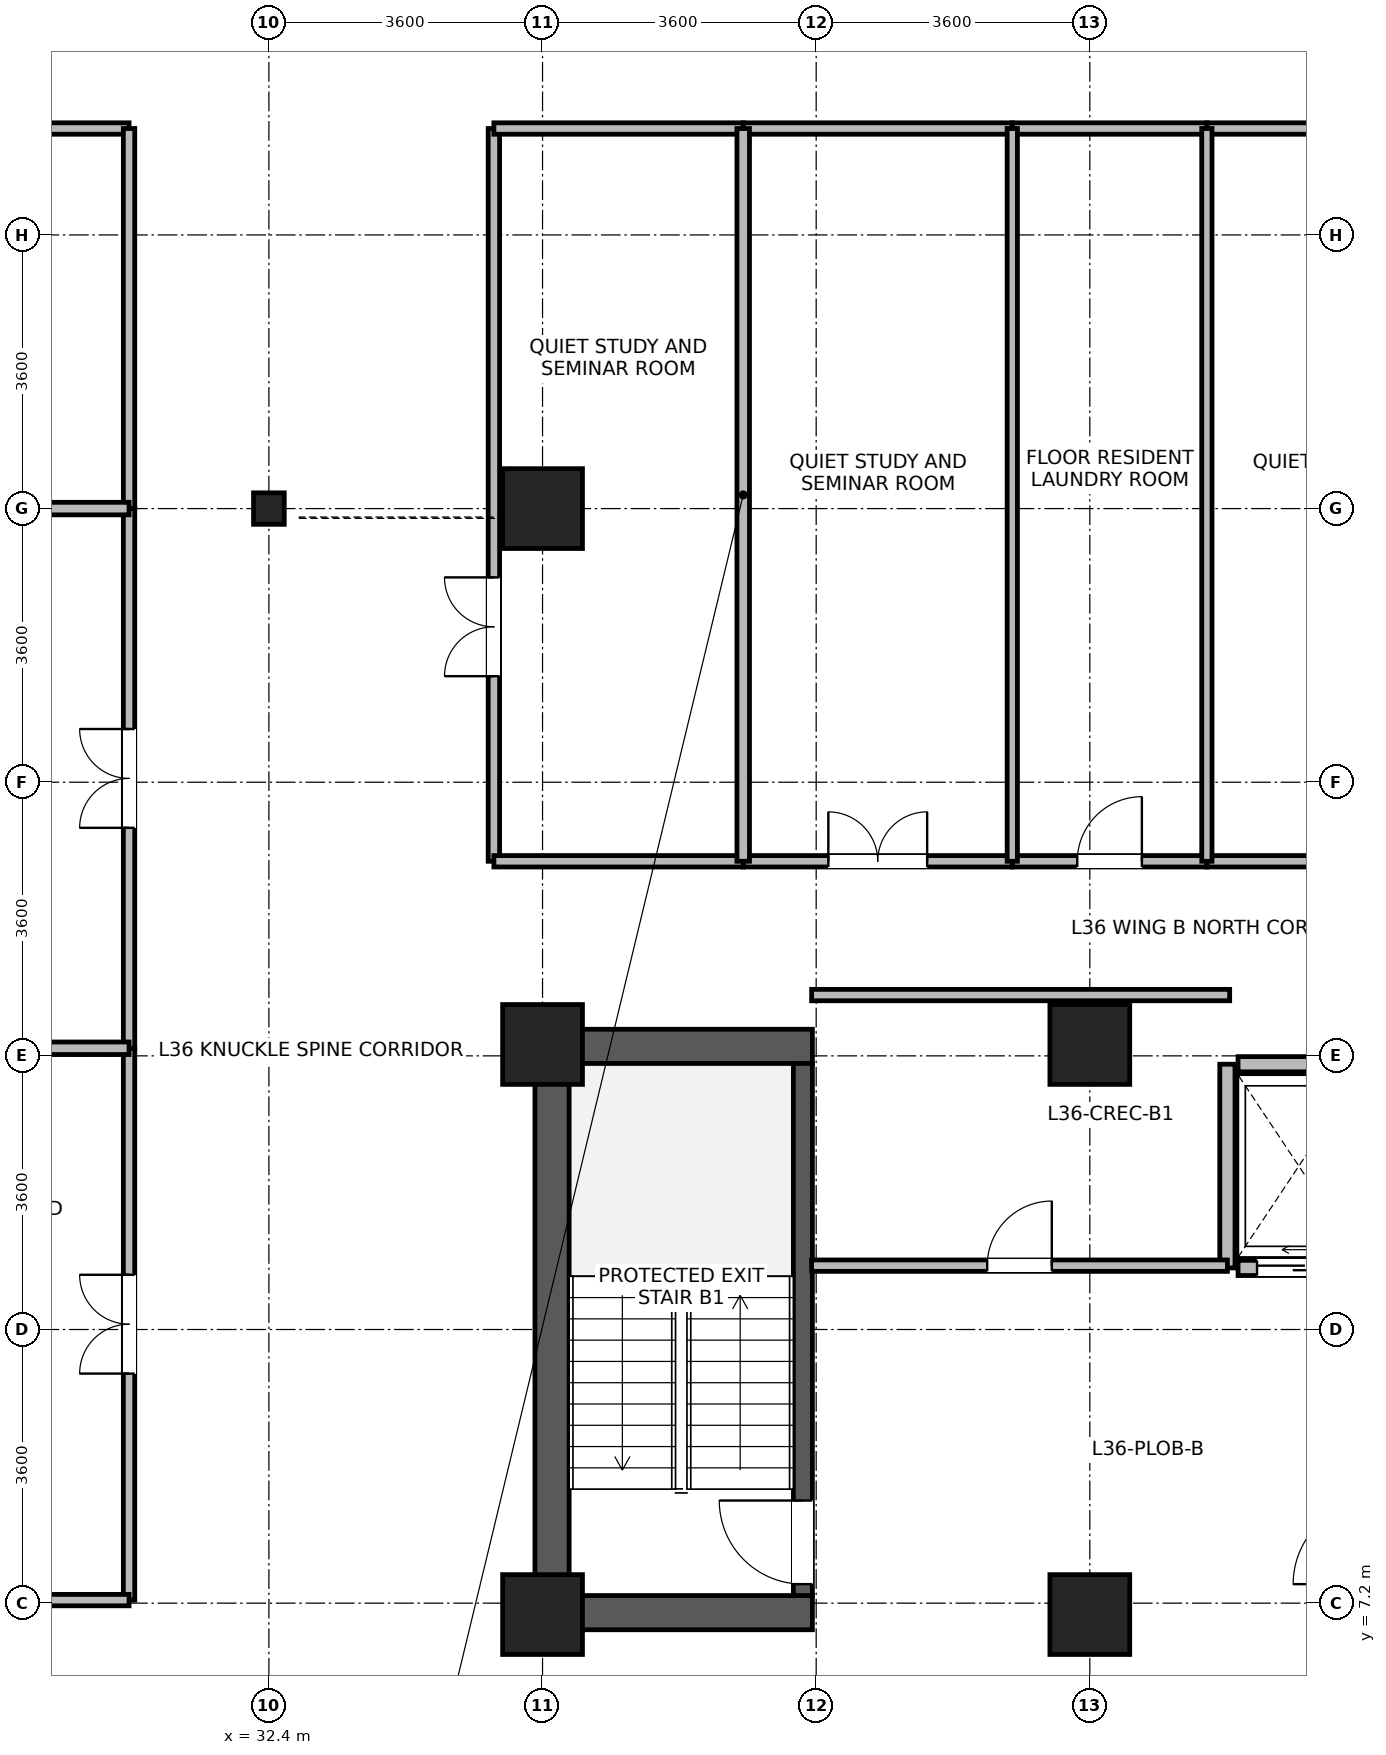
"""IFC4 building model, lengths in metres.
Left out: names, types, materials, properties, quantities, classifications, styles, units other than length and angle.
Written with IfcOpenShell. Run it as: python <this file> out.ifc"""

import sys

from ifc_helpers import new_model, si_unit, direction, frame, frame_2d, origin, origin_2d, place, context, subcontext, project, spatial, rectangle, i_section, extrude, source, transform, mapped, element, fill, save


model = new_model("IFC4")
c1 = context("Model", 3, precision=1e-05, world=origin(), true_north=direction((0.0, 1.0)))
c2 = subcontext(c1, "Body", "Model", "MODEL_VIEW")
j1 = project(units=[si_unit("LENGTHUNIT", "METRE"), si_unit("PLANEANGLEUNIT", "RADIAN")], contexts=[c1])
p1 = place(None, origin())
s1 = spatial("IfcSite", under=j1, at=p1, CompositionType="ELEMENT")
p2 = place(p1, origin())
s2 = spatial("IfcBuilding", under=s1, at=p2, CompositionType="ELEMENT")
p3 = place(p2, frame((0.0, 0.0, 143.9)))
s3 = spatial("IfcBuildingStorey", under=s2, at=p3, CompositionType="ELEMENT", Elevation=143.9)
p4 = place(p3, frame((36.125, 6.85, 0.0), z_axis=(0.0, 0.0, 1.0), x_axis=(0.0, 1.0, 0.0)))
e1 = element("IfcWall", 1, at=p4, inside=s3, PredefinedType="SHEAR", context=c2, shape_type="SweptSolid", body=[
    extrude(rectangle(XDim=7.9, YDim=0.45, at=frame_2d((3.95, 0.0))), origin(), (0.0, 0.0, 1.0), 3.46),
])
for number, where, z_axis, x_axis in (
    (2, (36.35, 7.075, 0.0), (0.0, 0.0, 1.0), (1.0, 0.0, 0.0)),
    (3, (36.35, 14.525, 0.0), (0.0, 0.0, 1.0), (1.0, 0.0, 0.0)),
):
    element("IfcWall", number, at=place(p3, frame(where, z_axis=z_axis, x_axis=x_axis)), inside=s3, PredefinedType="SHEAR", context=c2, shape_type="SweptSolid", body=[
        extrude(rectangle(XDim=3.2, YDim=0.45, at=frame_2d((1.6, 0.0))), origin(), (0.0, 0.0, 1.0), 3.46),
    ])
p5 = place(p3, frame((39.425, 7.3, 0.0), z_axis=(0.0, 0.0, 1.0), x_axis=(0.0, 1.0, 0.0)))
e4 = element("IfcWall", 4, at=p5, inside=s3, PredefinedType="SHEAR", context=c2, shape_type="SweptSolid", body=[
    extrude(rectangle(XDim=7.0, YDim=0.25, at=frame_2d((3.5, 0.0))), origin(), (0.0, 0.0, 1.0), 3.46),
])
p6 = place(p5, frame((0.15, 0.0, 0.0)))
e5 = element("IfcOpeningElement", 5, at=p6, cuts=e4, PredefinedType="OPENING", context=c2, shape_type="SweptSolid", body=[
    extrude(rectangle(XDim=1.1, YDim=2.08, at=frame_2d((0.55, 1.04))), frame((0.0, 0.135, 0.0), z_axis=(0.0, -1.0, 0.0), x_axis=(1.0, 0.0, 0.0)), (0.0, 0.0, 1.0), 0.27),
])
m1 = source(origin(), c2, "Body", "SweptSolid", [
    extrude(rectangle(XDim=1.05, YDim=1.05, at=origin_2d()), origin(), (0.0, 0.0, 1.0), 3.7),
])
for number, where, z_axis, x_axis in (
    (6, (36.0, 21.6, 0.0), (0.0, 0.0, 1.0), (1.0, 0.0, 0.0)),
    (7, (36.0, 7.05, 0.0), (0.0, 0.0, 1.0), (1.0, 0.0, 0.0)),
    (8, (36.0, 14.55, 0.0), (0.0, 0.0, 1.0), (1.0, 0.0, 0.0)),
    (9, (43.2, 7.05, 0.0), (0.0, 0.0, 1.0), (1.0, 0.0, 0.0)),
    (10, (43.2, 14.55, 0.0), (0.0, 0.0, 1.0), (1.0, 0.0, 0.0)),
):
    element("IfcColumn", number, at=place(p3, frame(where, z_axis=z_axis, x_axis=x_axis)), inside=s3, PredefinedType="COLUMN", context=c2, shape_type="MappedRepresentation", body=[
        mapped(m1, transform((0.0, 0.0, 0.0), x_axis=(1.0, 0.0, 0.0), y_axis=(0.0, 1.0, 0.0), z_axis=(0.0, 0.0, 1.0), scale=1.0)),
    ])
m2 = source(origin(), c2, "Body", "SweptSolid", [
    extrude(i_section(OverallWidth=0.404, OverallDepth=0.414, WebThickness=0.021, FlangeThickness=0.028, FilletRadius=0.015, at=origin_2d()), origin(), (0.0, 0.0, 1.0), 3.7),
])
p7 = place(p3, frame((32.4, 21.6, 0.0), z_axis=(0.0, 0.0, 1.0), x_axis=(1.0, 0.0, 0.0)))
e11 = element("IfcColumn", 11, at=p7, inside=s3, PredefinedType="COLUMN", context=c2, shape_type="MappedRepresentation", body=[
    mapped(m2, transform((0.0, 0.0, 0.0), x_axis=(1.0, 0.0, 0.0), y_axis=(0.0, 1.0, 0.0), z_axis=(0.0, 0.0, 1.0), scale=1.0)),
])
p8 = place(p3, frame((45.15, 11.61, 0.0), z_axis=(0.0, 0.0, 1.0), x_axis=(1.0, 0.0, 0.0)))
e12 = element("IfcWall", 12, at=p8, inside=s3, PredefinedType="PARTITIONING", context=c2, shape_type="SweptSolid", body=[
    extrude(rectangle(XDim=1.6, YDim=0.2, at=frame_2d((0.8, 0.0))), origin(), (0.0, 0.0, 1.0), 3.44),
])
p9 = place(p8, frame((0.25, 0.0, 0.0)))
e13 = element("IfcOpeningElement", 13, at=p9, cuts=e12, PredefinedType="OPENING", context=c2, shape_type="SweptSolid", body=[
    extrude(rectangle(XDim=1.1, YDim=2.12, at=frame_2d((0.55, 1.06))), frame((0.0, 0.11, 0.0), z_axis=(0.0, -1.0, 0.0), x_axis=(1.0, 0.0, 0.0)), (0.0, 0.0, 1.0), 0.22),
])
p10 = place(p3, frame((45.15, 14.29, 0.0), z_axis=(0.0, 0.0, 1.0), x_axis=(1.0, 0.0, 0.0)))
e14 = element("IfcWall", 14, at=p10, inside=s3, PredefinedType="PARTITIONING", context=c2, shape_type="SweptSolid", body=[
    extrude(rectangle(XDim=1.6, YDim=0.2, at=frame_2d((0.8, 0.0))), origin(), (0.0, 0.0, 1.0), 2.44),
])
p11 = place(p3, frame((45.01, 11.61, 0.0), z_axis=(0.0, 0.0, 1.0), x_axis=(0.0, 1.0, 0.0)))
e15 = element("IfcWall", 15, at=p11, inside=s3, PredefinedType="PARTITIONING", context=c2, shape_type="SweptSolid", body=[
    extrude(rectangle(XDim=2.68, YDim=0.2, at=frame_2d((1.34, 0.0))), origin(), (0.0, 0.0, 1.0), 3.44),
])
p12 = place(p3, frame((19.22, 26.6, 0.0), z_axis=(0.0, 0.0, 1.0), x_axis=(1.0, 0.0, 0.0)))
e16 = element("IfcWall", 16, at=p12, inside=s3, PredefinedType="PARTITIONING", context=c2, shape_type="SweptSolid", body=[
    extrude(rectangle(XDim=11.34, YDim=0.15, at=frame_2d((5.67, 0.0))), origin(), (0.0, 0.0, 1.0), 3.44),
])
p13 = place(p12, frame((5.02, 0.0, 0.0)))
e17 = element("IfcOpeningElement", 17, at=p13, cuts=e16, PredefinedType="OPENING", context=c2, shape_type="SweptSolid", body=[
    extrude(rectangle(XDim=1.3, YDim=2.12, at=frame_2d((0.65, 1.06))), frame((0.0, 0.085, 0.0), z_axis=(0.0, -1.0, 0.0), x_axis=(1.0, 0.0, 0.0)), (0.0, 0.0, 1.0), 0.17),
])
p14 = place(p3, frame((35.36, 16.96, 0.0), z_axis=(0.0, 0.0, 1.0), x_axis=(0.0, 1.0, 0.0)))
e18 = element("IfcWall", 18, at=p14, inside=s3, PredefinedType="PARTITIONING", context=c2, shape_type="SweptSolid", body=[
    extrude(rectangle(XDim=9.64, YDim=0.15, at=frame_2d((4.82, 0.0))), origin(), (0.0, 0.0, 1.0), 3.44),
])
p15 = place(p14, frame((2.435, 0.0, 0.0)))
e19 = element("IfcOpeningElement", 19, at=p15, cuts=e18, PredefinedType="OPENING", context=c2, shape_type="SweptSolid", body=[
    extrude(rectangle(XDim=1.3, YDim=2.12, at=frame_2d((0.65, 1.06))), frame((0.0, 0.085, 0.0), z_axis=(0.0, -1.0, 0.0), x_axis=(1.0, 0.0, 0.0)), (0.0, 0.0, 1.0), 0.17),
])
p16 = place(p3, frame((30.56, 7.24, 0.0), z_axis=(0.0, 0.0, 1.0), x_axis=(0.0, 1.0, 0.0)))
e20 = element("IfcWall", 20, at=p16, inside=s3, PredefinedType="PARTITIONING", context=c2, shape_type="SweptSolid", body=[
    extrude(rectangle(XDim=7.26, YDim=0.15, at=frame_2d((3.63, 0.0))), origin(), (0.0, 0.0, 1.0), 3.44),
])
p17 = place(p16, frame((2.98, 0.0, 0.0)))
e21 = element("IfcOpeningElement", 21, at=p17, cuts=e20, PredefinedType="OPENING", context=c2, shape_type="SweptSolid", body=[
    extrude(rectangle(XDim=1.3, YDim=2.12, at=frame_2d((0.65, 1.06))), frame((0.0, 0.085, 0.0), z_axis=(0.0, -1.0, 0.0), x_axis=(1.0, 0.0, 0.0)), (0.0, 0.0, 1.0), 0.17),
])
p18 = place(p3, frame((30.56, 14.5, 0.0), z_axis=(0.0, 0.0, 1.0), x_axis=(0.0, 1.0, 0.0)))
e22 = element("IfcWall", 22, at=p18, inside=s3, PredefinedType="PARTITIONING", context=c2, shape_type="SweptSolid", body=[
    extrude(rectangle(XDim=7.1, YDim=0.15, at=frame_2d((3.55, 0.0))), origin(), (0.0, 0.0, 1.0), 3.44),
])
p19 = place(p18, frame((2.9, 0.0, 0.0)))
e23 = element("IfcOpeningElement", 23, at=p19, cuts=e22, PredefinedType="OPENING", context=c2, shape_type="SweptSolid", body=[
    extrude(rectangle(XDim=1.3, YDim=2.12, at=frame_2d((0.65, 1.06))), frame((0.0, 0.085, 0.0), z_axis=(0.0, -1.0, 0.0), x_axis=(1.0, 0.0, 0.0)), (0.0, 0.0, 1.0), 0.17),
])
p20 = place(p3, frame((39.54, 11.64, 0.0), z_axis=(0.0, 0.0, 1.0), x_axis=(1.0, 0.0, 0.0)))
e24 = element("IfcWall", 24, at=p20, inside=s3, PredefinedType="PARTITIONING", context=c2, shape_type="SweptSolid", body=[
    extrude(rectangle(XDim=5.47, YDim=0.15, at=frame_2d((2.735, 0.0))), origin(), (0.0, 0.0, 1.0), 3.44),
])
p21 = place(p20, frame((2.31, 0.0, 0.0)))
e25 = element("IfcOpeningElement", 25, at=p21, cuts=e24, PredefinedType="OPENING", context=c2, shape_type="SweptSolid", body=[
    extrude(rectangle(XDim=0.85, YDim=2.04, at=frame_2d((0.425, 1.02))), frame((0.0, 0.085, 0.0), z_axis=(0.0, -1.0, 0.0), x_axis=(1.0, 0.0, 0.0)), (0.0, 0.0, 1.0), 0.17),
])
p22 = place(p3, frame((39.54, 15.2, 0.0), z_axis=(0.0, 0.0, 1.0), x_axis=(1.0, 0.0, 0.0)))
e26 = element("IfcWall", 26, at=p22, inside=s3, PredefinedType="PARTITIONING", context=c2, shape_type="SweptSolid", body=[
    extrude(rectangle(XDim=5.5, YDim=0.15, at=frame_2d((2.75, 0.0))), origin(), (0.0, 0.0, 1.0), 3.44),
])
p23 = place(p3, frame((30.56, 21.6, 0.0), z_axis=(0.0, 0.0, 1.0), x_axis=(0.0, 1.0, 0.0)))
e27 = element("IfcWall", 27, at=p23, inside=s3, PredefinedType="PARTITIONING", context=c2, shape_type="SweptSolid", body=[
    extrude(rectangle(XDim=5.0, YDim=0.15, at=frame_2d((2.5, 0.0))), origin(), (0.0, 0.0, 1.0), 3.44),
])
p24 = place(p3, frame((25.832, 7.24, 0.0), z_axis=(0.0, 0.0, 1.0), x_axis=(1.0, 0.0, 0.0)))
e28 = element("IfcWall", 28, at=p24, inside=s3, PredefinedType="PARTITIONING", context=c2, shape_type="SweptSolid", body=[
    extrude(rectangle(XDim=4.728, YDim=0.15, at=frame_2d((2.364, 0.0))), origin(), (0.0, 0.0, 1.0), 3.44),
])
p25 = place(p3, frame((44.74, 16.96, 0.0), z_axis=(0.0, 0.0, 1.0), x_axis=(1.0, 0.0, 0.0)))
e29 = element("IfcWall", 29, at=p25, inside=s3, PredefinedType="PARTITIONING", context=c2, shape_type="SweptSolid", body=[
    extrude(rectangle(XDim=4.78, YDim=0.15, at=frame_2d((2.39, 0.0))), origin(), (0.0, 0.0, 1.0), 3.44),
])
p26 = place(p25, frame((1.74, 0.0, 0.0)))
e30 = element("IfcOpeningElement", 30, at=p26, cuts=e29, PredefinedType="OPENING", context=c2, shape_type="SweptSolid", body=[
    extrude(rectangle(XDim=1.3, YDim=2.12, at=frame_2d((0.65, 1.06))), frame((0.0, 0.085, 0.0), z_axis=(0.0, -1.0, 0.0), x_axis=(1.0, 0.0, 0.0)), (0.0, 0.0, 1.0), 0.17),
])
p27 = place(p3, frame((44.74, 26.6, 0.0), z_axis=(0.0, 0.0, 1.0), x_axis=(1.0, 0.0, 0.0)))
e31 = element("IfcWall", 31, at=p27, inside=s3, PredefinedType="PARTITIONING", context=c2, shape_type="SweptSolid", body=[
    extrude(rectangle(XDim=4.78, YDim=0.15, at=frame_2d((2.39, 0.0))), origin(), (0.0, 0.0, 1.0), 3.44),
])
p28 = place(p3, frame((38.64, 16.96, 0.0), z_axis=(0.0, 0.0, 1.0), x_axis=(1.0, 0.0, 0.0)))
e32 = element("IfcWall", 32, at=p28, inside=s3, PredefinedType="PARTITIONING", context=c2, shape_type="SweptSolid", body=[
    extrude(rectangle(XDim=3.54, YDim=0.15, at=frame_2d((1.77, 0.0))), origin(), (0.0, 0.0, 1.0), 3.44),
])
p29 = place(p28, frame((1.12, 0.0, 0.0)))
e33 = element("IfcOpeningElement", 33, at=p29, cuts=e32, PredefinedType="OPENING", context=c2, shape_type="SweptSolid", body=[
    extrude(rectangle(XDim=1.3, YDim=2.12, at=frame_2d((0.65, 1.06))), frame((0.0, 0.085, 0.0), z_axis=(0.0, -1.0, 0.0), x_axis=(1.0, 0.0, 0.0)), (0.0, 0.0, 1.0), 0.17),
])
p30 = place(p3, frame((38.64, 26.6, 0.0), z_axis=(0.0, 0.0, 1.0), x_axis=(1.0, 0.0, 0.0)))
e34 = element("IfcWall", 34, at=p30, inside=s3, PredefinedType="PARTITIONING", context=c2, shape_type="SweptSolid", body=[
    extrude(rectangle(XDim=3.54, YDim=0.15, at=frame_2d((1.77, 0.0))), origin(), (0.0, 0.0, 1.0), 3.44),
])
for number, where, z_axis, x_axis in (
    (35, (35.36, 16.96, 0.0), (0.0, 0.0, 1.0), (1.0, 0.0, 0.0)),
    (36, (35.36, 26.6, 0.0), (0.0, 0.0, 1.0), (1.0, 0.0, 0.0)),
):
    element("IfcWall", number, at=place(p3, frame(where, z_axis=z_axis, x_axis=x_axis)), inside=s3, PredefinedType="PARTITIONING", context=c2, shape_type="SweptSolid", body=[
        extrude(rectangle(XDim=3.28, YDim=0.15, at=frame_2d((1.64, 0.0))), origin(), (0.0, 0.0, 1.0), 3.44),
    ])
p31 = place(p3, frame((42.18, 16.96, 0.0), z_axis=(0.0, 0.0, 1.0), x_axis=(1.0, 0.0, 0.0)))
e37 = element("IfcWall", 37, at=p31, inside=s3, PredefinedType="PARTITIONING", context=c2, shape_type="SweptSolid", body=[
    extrude(rectangle(XDim=2.56, YDim=0.15, at=frame_2d((1.28, 0.0))), origin(), (0.0, 0.0, 1.0), 3.44),
])
p32 = place(p31, frame((0.855, 0.0, 0.0)))
e38 = element("IfcOpeningElement", 38, at=p32, cuts=e37, PredefinedType="OPENING", context=c2, shape_type="SweptSolid", body=[
    extrude(rectangle(XDim=0.85, YDim=2.04, at=frame_2d((0.425, 1.02))), frame((0.0, 0.085, 0.0), z_axis=(0.0, -1.0, 0.0), x_axis=(1.0, 0.0, 0.0)), (0.0, 0.0, 1.0), 0.17),
])
p33 = place(p3, frame((42.18, 26.6, 0.0), z_axis=(0.0, 0.0, 1.0), x_axis=(1.0, 0.0, 0.0)))
e39 = element("IfcWall", 39, at=p33, inside=s3, PredefinedType="PARTITIONING", context=c2, shape_type="SweptSolid", body=[
    extrude(rectangle(XDim=2.56, YDim=0.15, at=frame_2d((1.28, 0.0))), origin(), (0.0, 0.0, 1.0), 3.44),
])
p34 = place(p3, frame((38.64, 16.96, 0.0), z_axis=(0.0, 0.0, 1.0), x_axis=(0.0, 1.0, 0.0)))
e40 = element("IfcWall", 40, at=p34, inside=s3, PredefinedType="PARTITIONING", context=c2, shape_type="SweptSolid", body=[
    extrude(rectangle(XDim=9.64, YDim=0.165, at=frame_2d((4.82, 0.0))), origin(), (0.0, 0.0, 1.0), 3.44),
])
for number, where, z_axis, x_axis in (
    (41, (42.18, 16.96, 0.0), (0.0, 0.0, 1.0), (0.0, 1.0, 0.0)),
    (42, (44.74, 16.96, 0.0), (0.0, 0.0, 1.0), (0.0, 1.0, 0.0)),
):
    element("IfcWall", number, at=place(p3, frame(where, z_axis=z_axis, x_axis=x_axis)), inside=s3, PredefinedType="PARTITIONING", context=c2, shape_type="SweptSolid", body=[
        extrude(rectangle(XDim=9.64, YDim=0.135, at=frame_2d((4.82, 0.0))), origin(), (0.0, 0.0, 1.0), 3.44),
    ])
p35 = place(p3, frame((25.832, 14.5, 0.0), z_axis=(0.0, 0.0, 1.0), x_axis=(1.0, 0.0, 0.0)))
e43 = element("IfcWall", 43, at=p35, inside=s3, PredefinedType="PARTITIONING", context=c2, shape_type="SweptSolid", body=[
    extrude(rectangle(XDim=4.728, YDim=0.165, at=frame_2d((2.364, 0.0))), origin(), (0.0, 0.0, 1.0), 3.44),
])
p36 = place(p3, frame((25.832, 21.6, 0.0), z_axis=(0.0, 0.0, 1.0), x_axis=(1.0, 0.0, 0.0)))
e44 = element("IfcWall", 44, at=p36, inside=s3, PredefinedType="PARTITIONING", context=c2, shape_type="SweptSolid", body=[
    extrude(rectangle(XDim=4.728, YDim=0.165, at=frame_2d((2.364, 0.0))), origin(), (0.0, 0.0, 1.0), 2.99),
])
p37 = place(p6, origin())
e45 = element("IfcDoor", 45, at=p37, inside=s3, OperationType="SINGLE_SWING_RIGHT", PredefinedType="DOOR", context=c2, shape_type="SweptSolid", body=[
    extrude(rectangle(XDim=1.1, YDim=2.08, at=frame_2d((0.55, 1.04))), frame((0.0, 0.025, 0.0), z_axis=(0.0, -1.0, 0.0), x_axis=(1.0, 0.0, 0.0)), (0.0, 0.0, 1.0), 0.05),
])
fill(e5, e45)
p38 = place(p9, origin())
e46 = element("IfcDoor", 46, at=p38, inside=s3, OperationType="SLIDING_TO_LEFT", PredefinedType="DOOR", context=c2, shape_type="SweptSolid", body=[
    extrude(rectangle(XDim=1.1, YDim=2.12, at=frame_2d((0.55, 1.06))), frame((0.0, 0.025, 0.0), z_axis=(0.0, -1.0, 0.0), x_axis=(1.0, 0.0, 0.0)), (0.0, 0.0, 1.0), 0.05),
])
fill(e13, e46)
p39 = place(p15, origin())
e47 = element("IfcDoor", 47, at=p39, inside=s3, OperationType="DOUBLE_DOOR_SINGLE_SWING", PredefinedType="DOOR", context=c2, shape_type="SweptSolid", body=[
    extrude(rectangle(XDim=1.3, YDim=2.12, at=frame_2d((0.65, 1.06))), frame((0.0, 0.025, 0.0), z_axis=(0.0, -1.0, 0.0), x_axis=(1.0, 0.0, 0.0)), (0.0, 0.0, 1.0), 0.05),
])
fill(e19, e47)
p40 = place(p17, origin())
e48 = element("IfcDoor", 48, at=p40, inside=s3, OperationType="DOUBLE_DOOR_SINGLE_SWING", PredefinedType="DOOR", context=c2, shape_type="SweptSolid", body=[
    extrude(rectangle(XDim=1.3, YDim=2.12, at=frame_2d((0.65, 1.06))), frame((0.0, 0.025, 0.0), z_axis=(0.0, -1.0, 0.0), x_axis=(1.0, 0.0, 0.0)), (0.0, 0.0, 1.0), 0.05),
])
fill(e21, e48)
p41 = place(p19, origin())
e49 = element("IfcDoor", 49, at=p41, inside=s3, OperationType="DOUBLE_DOOR_SINGLE_SWING", PredefinedType="DOOR", context=c2, shape_type="SweptSolid", body=[
    extrude(rectangle(XDim=1.3, YDim=2.12, at=frame_2d((0.65, 1.06))), frame((0.0, 0.025, 0.0), z_axis=(0.0, -1.0, 0.0), x_axis=(1.0, 0.0, 0.0)), (0.0, 0.0, 1.0), 0.05),
])
fill(e23, e49)
p42 = place(p21, origin())
e50 = element("IfcDoor", 50, at=p42, inside=s3, OperationType="SINGLE_SWING_RIGHT", PredefinedType="DOOR", context=c2, shape_type="SweptSolid", body=[
    extrude(rectangle(XDim=0.85, YDim=2.04, at=frame_2d((0.425, 1.02))), frame((0.0, 0.025, 0.0), z_axis=(0.0, -1.0, 0.0), x_axis=(1.0, 0.0, 0.0)), (0.0, 0.0, 1.0), 0.05),
])
fill(e25, e50)
p43 = place(p29, origin())
e51 = element("IfcDoor", 51, at=p43, inside=s3, OperationType="DOUBLE_DOOR_SINGLE_SWING", PredefinedType="DOOR", context=c2, shape_type="SweptSolid", body=[
    extrude(rectangle(XDim=1.3, YDim=2.12, at=frame_2d((0.65, 1.06))), frame((0.0, 0.025, 0.0), z_axis=(0.0, -1.0, 0.0), x_axis=(1.0, 0.0, 0.0)), (0.0, 0.0, 1.0), 0.05),
])
fill(e33, e51)
p44 = place(p32, origin())
e52 = element("IfcDoor", 52, at=p44, inside=s3, OperationType="SINGLE_SWING_RIGHT", PredefinedType="DOOR", context=c2, shape_type="SweptSolid", body=[
    extrude(rectangle(XDim=0.85, YDim=2.04, at=frame_2d((0.425, 1.02))), frame((0.0, 0.025, 0.0), z_axis=(0.0, -1.0, 0.0), x_axis=(1.0, 0.0, 0.0)), (0.0, 0.0, 1.0), 0.05),
])
fill(e38, e52)
save(model, sys.argv[1])
